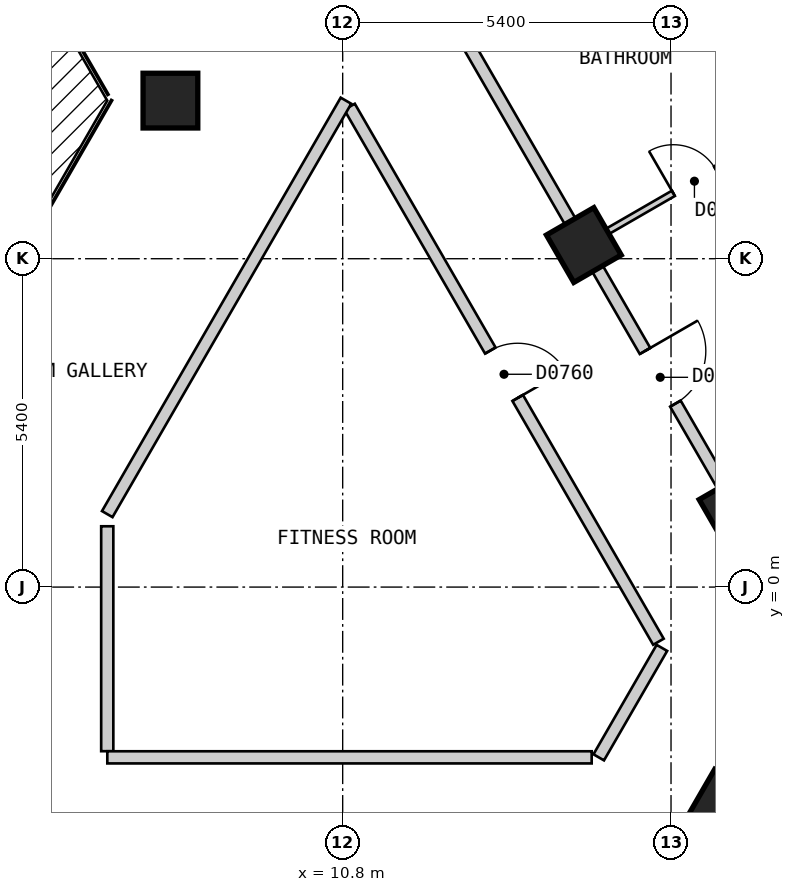
"""IFC4 building model, lengths in metres.
Left out: names, types, materials, properties, quantities, classifications, styles, units other than length and angle.
Written with IfcOpenShell. Run it as: python <this file> out.ifc"""

import sys

from ifc_helpers import new_model, si_unit, direction, frame, frame_2d, origin, origin_2d, place, context, subcontext, project, spatial, polyline, rectangle, outline, extrude, element, fill, save


model = new_model("IFC4")
c1 = context("Model", 3, precision=1e-05, world=origin(), true_north=direction((0.0, 1.0)))
c2 = subcontext(c1, "Body", "Model", "MODEL_VIEW")
j1 = project(units=[si_unit("LENGTHUNIT", "METRE"), si_unit("PLANEANGLEUNIT", "RADIAN")], contexts=[c1])
p1 = place(None, origin())
s1 = spatial("IfcSite", under=j1, at=p1, CompositionType="ELEMENT")
p2 = place(p1, origin())
s2 = spatial("IfcBuilding", under=s1, at=p2, CompositionType="ELEMENT")
p3 = place(p2, frame((0.0, 0.0, 93.0)))
s3 = spatial("IfcBuildingStorey", under=s2, at=p3, CompositionType="ELEMENT", Elevation=93.0)
for number, where, z_axis, x_axis in (
    (1, (17.083, -3.612, 0.0), (0.0, 0.0, 1.0), (0.5, 0.866, 0.0)),
    (2, (17.278, 1.274, 0.0), (0.0, 0.0, 1.0), (-0.5, 0.866, 0.0)),
    (3, (14.766, 5.625, 0.0), (0.0, 0.0, 1.0), (-0.5, 0.866, 0.0)),
    (4, (7.967, 8.0, 0.0), (0.0, 0.0, 1.0), (1.0, 0.0, 0.0)),
):
    element("IfcColumn", number, at=place(p3, frame(where, z_axis=z_axis, x_axis=x_axis)), inside=s3, PredefinedType="COLUMN", context=c2, shape_type="SweptSolid", body=[
        extrude(rectangle(XDim=0.9, YDim=0.9, at=origin_2d()), origin(), (0.0, 0.0, 1.0), 3.0),
    ])
p4 = place(p3, frame((29.027, 1.425, 0.0), z_axis=(0.0, 0.0, 1.0), x_axis=(-0.500027479704, 0.866009537788, 0.0)))
e5 = element("IfcWall", 5, at=p4, inside=s3, PredefinedType="SOLIDWALL", context=c2, shape_type="SweptSolid", body=[
    extrude(outline(polyline([(0.0, -0.15), (26.559, -0.15), (26.478, 0.15), (0.08, 0.15), (0.0, -0.15)])), origin(), (0.0, 0.0, 1.0), 2.7),
])
p5 = place(p4, frame((1.227, 0.0, 0.15)))
e6 = element("IfcOpeningElement", 6, at=p5, cuts=e5, PredefinedType="OPENING", context=c2, shape_type="SweptSolid", body=[
    extrude(rectangle(XDim=1.5, YDim=2.1, at=frame_2d((0.75, 1.05))), frame((0.0, 0.16, 0.0), z_axis=(0.0, -1.0, 0.0), x_axis=(1.0, 0.0, 0.0)), (0.0, 0.0, 1.0), 0.32),
])
p6 = place(p4, frame((3.738, 0.0, 0.15)))
e7 = element("IfcOpeningElement", 7, at=p6, cuts=e5, PredefinedType="OPENING", context=c2, shape_type="SweptSolid", body=[
    extrude(rectangle(XDim=1.5, YDim=2.1, at=frame_2d((0.75, 1.05))), frame((0.0, 0.16, 0.0), z_axis=(0.0, -1.0, 0.0), x_axis=(1.0, 0.0, 0.0)), (0.0, 0.0, 1.0), 0.32),
])
p7 = place(p4, frame((6.25, 0.0, 0.15)))
e8 = element("IfcOpeningElement", 8, at=p7, cuts=e5, PredefinedType="OPENING", context=c2, shape_type="SweptSolid", body=[
    extrude(rectangle(XDim=1.5, YDim=2.1, at=frame_2d((0.75, 1.05))), frame((0.0, 0.16, 0.0), z_axis=(0.0, -1.0, 0.0), x_axis=(1.0, 0.0, 0.0)), (0.0, 0.0, 1.0), 0.32),
])
p8 = place(p4, frame((8.761, 0.0, 0.15)))
e9 = element("IfcOpeningElement", 9, at=p8, cuts=e5, PredefinedType="OPENING", context=c2, shape_type="SweptSolid", body=[
    extrude(rectangle(XDim=1.5, YDim=2.1, at=frame_2d((0.75, 1.05))), frame((0.0, 0.16, 0.0), z_axis=(0.0, -1.0, 0.0), x_axis=(1.0, 0.0, 0.0)), (0.0, 0.0, 1.0), 0.32),
])
p9 = place(p4, frame((11.273, 0.0, 0.15)))
e10 = element("IfcOpeningElement", 10, at=p9, cuts=e5, PredefinedType="OPENING", context=c2, shape_type="SweptSolid", body=[
    extrude(rectangle(XDim=1.5, YDim=2.1, at=frame_2d((0.75, 1.05))), frame((0.0, 0.16, 0.0), z_axis=(0.0, -1.0, 0.0), x_axis=(1.0, 0.0, 0.0)), (0.0, 0.0, 1.0), 0.32),
])
p10 = place(p4, frame((13.785, 0.0, 0.15)))
e11 = element("IfcOpeningElement", 11, at=p10, cuts=e5, PredefinedType="OPENING", context=c2, shape_type="SweptSolid", body=[
    extrude(rectangle(XDim=1.5, YDim=2.1, at=frame_2d((0.75, 1.05))), frame((0.0, 0.16, 0.0), z_axis=(0.0, -1.0, 0.0), x_axis=(1.0, 0.0, 0.0)), (0.0, 0.0, 1.0), 0.32),
])
p11 = place(p4, frame((16.296, 0.0, 0.15)))
e12 = element("IfcOpeningElement", 12, at=p11, cuts=e5, PredefinedType="OPENING", context=c2, shape_type="SweptSolid", body=[
    extrude(rectangle(XDim=1.5, YDim=2.1, at=frame_2d((0.75, 1.05))), frame((0.0, 0.16, 0.0), z_axis=(0.0, -1.0, 0.0), x_axis=(1.0, 0.0, 0.0)), (0.0, 0.0, 1.0), 0.32),
])
p12 = place(p4, frame((18.807, 0.0, 0.15)))
e13 = element("IfcOpeningElement", 13, at=p12, cuts=e5, PredefinedType="OPENING", context=c2, shape_type="SweptSolid", body=[
    extrude(rectangle(XDim=1.5, YDim=2.1, at=frame_2d((0.75, 1.05))), frame((0.0, 0.16, 0.0), z_axis=(0.0, -1.0, 0.0), x_axis=(1.0, 0.0, 0.0)), (0.0, 0.0, 1.0), 0.32),
])
p13 = place(p4, frame((21.319, 0.0, 0.15)))
e14 = element("IfcOpeningElement", 14, at=p13, cuts=e5, PredefinedType="OPENING", context=c2, shape_type="SweptSolid", body=[
    extrude(rectangle(XDim=1.5, YDim=2.1, at=frame_2d((0.75, 1.05))), frame((0.0, 0.16, 0.0), z_axis=(0.0, -1.0, 0.0), x_axis=(1.0, 0.0, 0.0)), (0.0, 0.0, 1.0), 0.32),
])
p14 = place(p4, frame((23.831, 0.0, 0.15)))
e15 = element("IfcOpeningElement", 15, at=p14, cuts=e5, PredefinedType="OPENING", context=c2, shape_type="SweptSolid", body=[
    extrude(rectangle(XDim=1.5, YDim=2.1, at=frame_2d((0.75, 1.05))), frame((0.0, 0.16, 0.0), z_axis=(0.0, -1.0, 0.0), x_axis=(1.0, 0.0, 0.0)), (0.0, 0.0, 1.0), 0.32),
])
p15 = place(p3, frame((10.913, 7.899, 0.0), z_axis=(0.0, 0.0, 1.0), x_axis=(0.500028940566, -0.866008694296, 0.0)))
e16 = element("IfcWall", 16, at=p15, inside=s3, PredefinedType="PARTITIONING", context=c2, shape_type="SweptSolid", body=[
    extrude(rectangle(XDim=10.159, YDim=0.2, at=frame_2d((5.08, 0.0))), origin(), (0.0, 0.0, 1.0), 2.7),
])
p16 = place(p15, frame((4.63, 0.0, 0.0)))
e17 = element("IfcOpeningElement", 17, at=p16, cuts=e16, PredefinedType="OPENING", context=c2, shape_type="SweptSolid", body=[
    extrude(rectangle(XDim=0.9, YDim=2.1, at=frame_2d((0.45, 1.05))), frame((0.0, 0.11, 0.0), z_axis=(0.0, -1.0, 0.0), x_axis=(1.0, 0.0, 0.0)), (0.0, 0.0, 1.0), 0.22),
])
p17 = place(p3, frame((8.488, 16.5, 0.0), z_axis=(0.0, 0.0, 1.0), x_axis=(0.499986836607, -0.86603300354, 0.0)))
e18 = element("IfcWall", 18, at=p17, inside=s3, PredefinedType="PARTITIONING", context=c2, shape_type="SweptSolid", body=[
    extrude(rectangle(XDim=20.09, YDim=0.2, at=frame_2d((10.045, 0.0))), origin(), (0.0, 0.0, 1.0), 2.7),
])
p18 = place(p17, frame((14.569, 0.0, 0.0)))
e19 = element("IfcOpeningElement", 19, at=p18, cuts=e18, PredefinedType="OPENING", context=c2, shape_type="SweptSolid", body=[
    extrude(rectangle(XDim=1.0, YDim=2.1, at=frame_2d((0.5, 1.05))), frame((0.0, 0.11, 0.0), z_axis=(0.0, -1.0, 0.0), x_axis=(1.0, 0.0, 0.0)), (0.0, 0.0, 1.0), 0.22),
])
p19 = place(p17, frame((4.547, 0.0, 0.0)))
e20 = element("IfcOpeningElement", 20, at=p19, cuts=e18, PredefinedType="OPENING", context=c2, shape_type="SweptSolid", body=[
    extrude(rectangle(XDim=1.0, YDim=2.1, at=frame_2d((0.5, 1.05))), frame((0.0, 0.11, 0.0), z_axis=(0.0, -1.0, 0.0), x_axis=(1.0, 0.0, 0.0)), (0.0, 0.0, 1.0), 0.22),
])
p20 = place(p3, frame((6.928, 1.0, 0.0), z_axis=(0.0, 0.0, 1.0), x_axis=(0.0, -1.0, 0.0)))
e21 = element("IfcWall", 21, at=p20, inside=s3, PredefinedType="PARTITIONING", context=c2, shape_type="SweptSolid", body=[
    extrude(rectangle(XDim=3.699, YDim=0.2, at=frame_2d((1.85, 0.0))), origin(), (0.0, 0.0, 1.0), 2.7),
])
p21 = place(p3, frame((6.929, -2.8, 0.0), z_axis=(0.0, 0.0, 1.0), x_axis=(1.0, 0.0, 0.0)))
e22 = element("IfcWall", 22, at=p21, inside=s3, PredefinedType="PARTITIONING", context=c2, shape_type="SweptSolid", body=[
    extrude(rectangle(XDim=7.966, YDim=0.2, at=frame_2d((3.983, 0.0))), origin(), (0.0, 0.0, 1.0), 2.7),
])
p22 = place(p3, frame((6.928, 1.2, 0.0), z_axis=(0.0, 0.0, 1.0), x_axis=(0.500055327065, 0.865993458332, 0.0)))
e23 = element("IfcWall", 23, at=p22, inside=s3, PredefinedType="PARTITIONING", context=c2, shape_type="SweptSolid", body=[
    extrude(rectangle(XDim=7.851, YDim=0.2, at=frame_2d((3.926, 0.0))), origin(), (0.0, 0.0, 1.0), 2.7),
])
p23 = place(p3, frame((15.011, -2.8, 0.0), z_axis=(0.0, 0.0, 1.0), x_axis=(0.499929208183, 0.866066271601, 0.0)))
e24 = element("IfcWall", 24, at=p23, inside=s3, PredefinedType="PARTITIONING", context=c2, shape_type="SweptSolid", body=[
    extrude(rectangle(XDim=2.078, YDim=0.2, at=frame_2d((1.039, 0.0))), origin(), (0.0, 0.0, 1.0), 2.7),
])
p24 = place(p3, frame((15.771, -5.884, 0.0), z_axis=(0.0, 0.0, 1.0), x_axis=(0.499917542299, 0.866073005526, 0.0)))
e25 = element("IfcWall", 25, at=p24, inside=s3, PredefinedType="PARTITIONING", context=c2, shape_type="SweptSolid", body=[
    extrude(rectangle(XDim=5.525, YDim=0.2, at=frame_2d((2.762, 0.0))), origin(), (0.0, 0.0, 1.0), 2.7),
])
p25 = place(p3, frame((15.942, 11.988, 0.0), z_axis=(0.0, 0.0, 1.0), x_axis=(0.499995794706, -0.866027831699, 0.0)))
e26 = element("IfcWall", 26, at=p25, inside=s3, PredefinedType="PARTITIONING", context=c2, shape_type="SweptSolid", body=[
    extrude(rectangle(XDim=4.922, YDim=0.1, at=frame_2d((2.461, 0.0))), origin(), (0.0, 0.0, 1.0), 2.7),
])
p26 = place(p3, frame((14.853, 5.675, 0.0), z_axis=(0.0, 0.0, 1.0), x_axis=(0.866016855193, 0.500014806302, 0.0)))
e27 = element("IfcWall", 27, at=p26, inside=s3, PredefinedType="PARTITIONING", context=c2, shape_type="SweptSolid", body=[
    extrude(rectangle(XDim=10.0, YDim=0.1, at=frame_2d((5.0, 0.0))), origin(), (0.0, 0.0, 1.0), 2.7),
])
p27 = place(p26, frame((1.6, 0.0, 0.0)))
e28 = element("IfcOpeningElement", 28, at=p27, cuts=e27, PredefinedType="OPENING", context=c2, shape_type="SweptSolid", body=[
    extrude(rectangle(XDim=0.8, YDim=2.1, at=frame_2d((0.4, 1.05))), frame((0.0, 0.06, 0.0), z_axis=(0.0, -1.0, 0.0), x_axis=(1.0, 0.0, 0.0)), (0.0, 0.0, 1.0), 0.12),
])
p28 = place(p26, frame((6.6, 0.0, 0.0)))
e29 = element("IfcOpeningElement", 29, at=p28, cuts=e27, PredefinedType="OPENING", context=c2, shape_type="SweptSolid", body=[
    extrude(rectangle(XDim=0.9, YDim=2.1, at=frame_2d((0.45, 1.05))), frame((0.0, 0.06, 0.0), z_axis=(0.0, -1.0, 0.0), x_axis=(1.0, 0.0, 0.0)), (0.0, 0.0, 1.0), 0.12),
])
p29 = place(p18, origin())
e30 = element("IfcDoor", 30, at=p29, inside=s3, OperationType="SINGLE_SWING_LEFT", PredefinedType="DOOR", context=c2, shape_type="SweptSolid", body=[
    extrude(rectangle(XDim=1.0, YDim=2.1, at=frame_2d((0.5, 1.05))), frame((0.0, 0.025, 0.0), z_axis=(0.0, -1.0, 0.0), x_axis=(1.0, 0.0, 0.0)), (0.0, 0.0, 1.0), 0.05),
])
fill(e19, e30)
p30 = place(p27, origin())
e31 = element("IfcDoor", 31, at=p30, inside=s3, OperationType="SINGLE_SWING_LEFT", PredefinedType="DOOR", context=c2, shape_type="SweptSolid", body=[
    extrude(rectangle(XDim=0.8, YDim=2.1, at=frame_2d((0.4, 1.05))), frame((0.0, 0.025, 0.0), z_axis=(0.0, -1.0, 0.0), x_axis=(1.0, 0.0, 0.0)), (0.0, 0.0, 1.0), 0.05),
])
fill(e28, e31)
p31 = place(p16, origin())
e32 = element("IfcDoor", 32, at=p31, inside=s3, OperationType="SINGLE_SWING_RIGHT", PredefinedType="DOOR", context=c2, shape_type="SweptSolid", body=[
    extrude(rectangle(XDim=0.9, YDim=2.1, at=frame_2d((0.45, 1.05))), frame((0.0, 0.025, 0.0), z_axis=(0.0, -1.0, 0.0), x_axis=(1.0, 0.0, 0.0)), (0.0, 0.0, 1.0), 0.05),
])
fill(e17, e32)
save(model, sys.argv[1])
